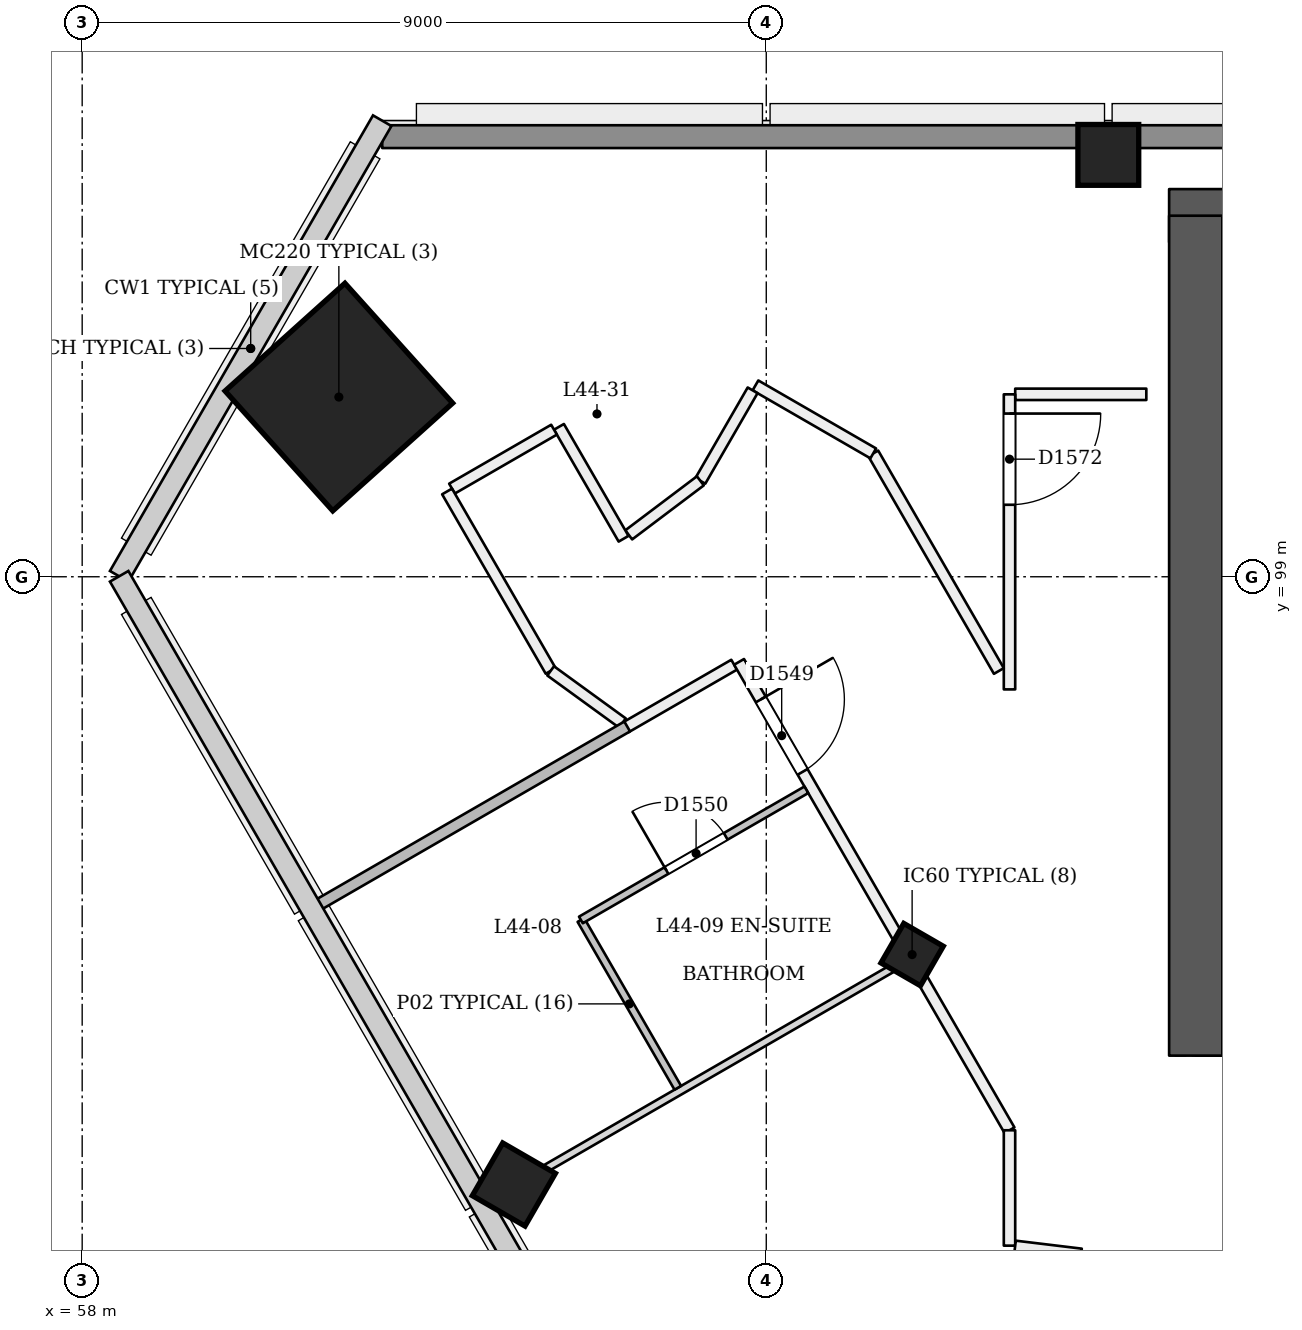
"""IFC4 building model, lengths in metres.
Left out: names, types, materials, properties, quantities, classifications, styles, units other than length and angle.
Written with IfcOpenShell. Run it as: python <this file> out.ifc"""

import sys

from ifc_helpers import new_model, si_unit, direction, frame, frame_2d, origin, origin_2d, place, context, subcontext, project, spatial, rectangle, extrude, element, fill, save


model = new_model("IFC4")
c1 = context("Model", 3, precision=1e-05, world=origin(), true_north=direction((0.0, 1.0)))
c2 = subcontext(c1, "Body", "Model", "MODEL_VIEW")
j1 = project(units=[si_unit("LENGTHUNIT", "METRE"), si_unit("PLANEANGLEUNIT", "RADIAN")], contexts=[c1])
p1 = place(None, origin())
s1 = spatial("IfcSite", under=j1, at=p1, CompositionType="ELEMENT")
p2 = place(p1, origin())
s2 = spatial("IfcBuilding", under=s1, at=p2, CompositionType="ELEMENT")
p3 = place(p2, frame((0.0, 0.0, 171.0)))
s3 = spatial("IfcBuildingStorey", under=s2, at=p3, CompositionType="ELEMENT", Elevation=171.0)
p4 = place(p3, frame((72.65, 93.05, 0.0), z_axis=(0.0, 0.0, 1.0), x_axis=(1.0, 0.0, 0.0)))
e1 = element("IfcWall", 1, at=p4, inside=s3, PredefinedType="SHEAR", context=c2, shape_type="SweptSolid", body=[
    extrude(rectangle(XDim=25.05, YDim=0.7, at=frame_2d((12.525, 0.0))), origin(), (0.0, 0.0, 1.0), 3.6),
])
p5 = place(p4, frame((1.15, 0.0, 0.0)))
e2 = element("IfcOpeningElement", 2, at=p5, cuts=e1, PredefinedType="OPENING", context=c2, shape_type="SweptSolid", body=[
    extrude(rectangle(XDim=1.2, YDim=2.1, at=frame_2d((0.6, 1.05))), frame((0.0, 0.36, 0.0), z_axis=(0.0, -1.0, 0.0), x_axis=(1.0, 0.0, 0.0)), (0.0, 0.0, 1.0), 0.721),
])
p6 = place(p4, frame((3.35, 0.0, 0.0)))
e3 = element("IfcOpeningElement", 3, at=p6, cuts=e1, PredefinedType="OPENING", context=c2, shape_type="SweptSolid", body=[
    extrude(rectangle(XDim=1.2, YDim=2.1, at=frame_2d((0.6, 1.05))), frame((0.0, 0.36, 0.0), z_axis=(0.0, -1.0, 0.0), x_axis=(1.0, 0.0, 0.0)), (0.0, 0.0, 1.0), 0.721),
])
p7 = place(p4, frame((13.35, 0.0, 0.0)))
e4 = element("IfcOpeningElement", 4, at=p7, cuts=e1, PredefinedType="OPENING", context=c2, shape_type="SweptSolid", body=[
    extrude(rectangle(XDim=1.2, YDim=2.1, at=frame_2d((0.6, 1.05))), frame((0.0, 0.36, 0.0), z_axis=(0.0, -1.0, 0.0), x_axis=(1.0, 0.0, 0.0)), (0.0, 0.0, 1.0), 0.721),
])
p8 = place(p4, frame((16.762, 0.0, 0.0)))
e5 = element("IfcOpeningElement", 5, at=p8, cuts=e1, PredefinedType="OPENING", context=c2, shape_type="SweptSolid", body=[
    extrude(rectangle(XDim=1.0, YDim=2.1, at=frame_2d((0.5, 1.05))), frame((0.0, 0.36, 0.0), z_axis=(0.0, -1.0, 0.0), x_axis=(1.0, 0.0, 0.0)), (0.0, 0.0, 1.0), 0.721),
])
p9 = place(p4, frame((20.65, 0.0, 0.0)))
e6 = element("IfcOpeningElement", 6, at=p9, cuts=e1, PredefinedType="OPENING", context=c2, shape_type="SweptSolid", body=[
    extrude(rectangle(XDim=1.0, YDim=2.1, at=frame_2d((0.5, 1.05))), frame((0.0, 0.36, 0.0), z_axis=(0.0, -1.0, 0.0), x_axis=(1.0, 0.0, 0.0)), (0.0, 0.0, 1.0), 0.721),
])
p10 = place(p4, frame((23.087, 0.0, 0.0)))
e7 = element("IfcOpeningElement", 7, at=p10, cuts=e1, PredefinedType="OPENING", context=c2, shape_type="SweptSolid", body=[
    extrude(rectangle(XDim=1.0, YDim=2.1, at=frame_2d((0.5, 1.05))), frame((0.0, 0.36, 0.0), z_axis=(0.0, -1.0, 0.0), x_axis=(1.0, 0.0, 0.0)), (0.0, 0.0, 1.0), 0.721),
])
p11 = place(p3, frame((97.35, 103.75, 0.0), z_axis=(0.0, 0.0, 1.0), x_axis=(-1.0, 0.0, 0.0)))
e8 = element("IfcWall", 8, at=p11, inside=s3, PredefinedType="SHEAR", context=c2, shape_type="SweptSolid", body=[
    extrude(rectangle(XDim=25.05, YDim=0.7, at=frame_2d((12.525, 0.0))), origin(), (0.0, 0.0, 1.0), 3.6),
])
p12 = place(p3, frame((72.65, 103.75, 0.0), z_axis=(0.0, 0.0, 1.0), x_axis=(0.0, -1.0, 0.0)))
e9 = element("IfcWall", 9, at=p12, inside=s3, PredefinedType="SHEAR", context=c2, shape_type="SweptSolid", body=[
    extrude(rectangle(XDim=11.05, YDim=0.7, at=frame_2d((5.525, 0.0))), origin(), (0.0, 0.0, 1.0), 3.6),
])
p13 = place(p3, frame((68.892, 93.982, -0.018), z_axis=(0.022153634206, 0.038480930364, 0.999013730882), x_axis=(-0.864979728815, -0.500331280926, 0.038453583269)))
e10 = element("IfcColumn", 10, at=p13, inside=s3, PredefinedType="COLUMN", context=c2, shape_type="SweptSolid", body=[
    extrude(rectangle(XDim=0.6, YDim=0.6, at=origin_2d()), origin(), (0.0, 0.0, 1.0), 3.604),
])
p14 = place(p3, frame((61.343, 101.353, 0.0), z_axis=(0.028401796786, 0.009286506348, 0.999553449666), x_axis=(-0.866206321778, 0.499287135176, 0.019974102218)))
e11 = element("IfcColumn", 11, at=p14, inside=s3, PredefinedType="COLUMN", context=c2, shape_type="SweptSolid", body=[
    extrude(rectangle(XDim=2.12, YDim=2.12, at=origin_2d()), origin(), (0.0, 0.0, 1.0), 3.602),
])
p15 = place(p3, frame((71.5, 104.55, 0.0), z_axis=(0.0, 0.0, 1.0), x_axis=(1.0, 0.0, 0.0)))
e12 = element("IfcColumn", 12, at=p15, inside=s3, PredefinedType="COLUMN", context=c2, shape_type="SweptSolid", body=[
    extrude(rectangle(XDim=0.8, YDim=0.8, at=origin_2d()), origin(), (0.0, 0.0, 1.0), 3.6),
])
p16 = place(p3, frame((63.652, 90.957, -0.024), z_axis=(0.02215519141, 0.038415882353, 0.999016199807), x_axis=(-0.865361947816, -0.499673614488, 0.038405445666)))
e13 = element("IfcColumn", 13, at=p16, inside=s3, PredefinedType="COLUMN", context=c2, shape_type="SweptSolid", body=[
    extrude(rectangle(XDim=0.8, YDim=0.8, at=origin_2d()), origin(), (0.0, 0.0, 1.0), 3.604),
])
p17 = place(p3, frame((65.151, 97.019, 0.0), z_axis=(0.0, 0.0, 1.0), x_axis=(0.865980649312, 0.50007750901, 0.0)))
e14 = element("IfcWall", 14, at=p17, inside=s3, PredefinedType="PARTITIONING", context=c2, shape_type="SweptSolid", body=[
    extrude(rectangle(XDim=1.647, YDim=0.15, at=frame_2d((0.823, 0.0))), origin(), (0.0, 0.0, 1.0), 3.15),
])
p18 = place(p3, frame((66.642, 97.88, 0.0), z_axis=(0.0, 0.0, 1.0), x_axis=(0.499976887781, -0.866038747219, 0.0)))
e15 = element("IfcWall", 15, at=p18, inside=s3, PredefinedType="PARTITIONING", context=c2, shape_type="SweptSolid", body=[
    extrude(rectangle(XDim=7.115, YDim=0.15, at=frame_2d((3.558, 0.0))), origin(), (0.0, 0.0, 1.0), 2.75),
])
p19 = place(p18, frame((0.571, 0.0, 0.0)))
e16 = element("IfcOpeningElement", 16, at=p19, cuts=e15, PredefinedType="OPENING", context=c2, shape_type="SweptSolid", body=[
    extrude(rectangle(XDim=1.1, YDim=2.1, at=frame_2d((0.55, 1.05))), frame((0.0, 0.085, 0.0), z_axis=(0.0, -1.0, 0.0), x_axis=(1.0, 0.0, 0.0)), (0.0, 0.0, 1.0), 0.171),
])
p20 = place(p3, frame((70.2, 91.718, 0.0), z_axis=(0.0, 0.0, 1.0), x_axis=(0.0, -1.0, 0.0)))
e17 = element("IfcWall", 17, at=p20, inside=s3, PredefinedType="PARTITIONING", context=c2, shape_type="SweptSolid", body=[
    extrude(rectangle(XDim=1.518, YDim=0.15, at=frame_2d((0.759, 0.0))), origin(), (0.0, 0.0, 1.0), 3.15),
])
p21 = place(p3, frame((70.274, 90.191, 0.0), z_axis=(0.0, 0.0, 1.0), x_axis=(0.99277212406, -0.120014622813, 0.0)))
e18 = element("IfcWall", 18, at=p21, inside=s3, PredefinedType="PARTITIONING", context=c2, shape_type="SweptSolid", body=[
    extrude(rectangle(XDim=0.875, YDim=0.15, at=frame_2d((0.438, 0.0))), origin(), (0.0, 0.0, 1.0), 3.15),
])
p22 = place(p3, frame((72.0, 101.4, 0.0), z_axis=(0.0, 0.0, 1.0), x_axis=(-1.0, 0.0, 0.0)))
e19 = element("IfcWall", 19, at=p22, inside=s3, PredefinedType="PARTITIONING", context=c2, shape_type="SweptSolid", body=[
    extrude(rectangle(XDim=1.725, YDim=0.15, at=frame_2d((0.863, 0.0))), origin(), (0.0, 0.0, 1.0), 3.15),
])
p23 = place(p3, frame((70.2, 101.4, 0.0), z_axis=(0.0, 0.0, 1.0), x_axis=(0.0, -1.0, 0.0)))
e20 = element("IfcWall", 20, at=p23, inside=s3, PredefinedType="PARTITIONING", context=c2, shape_type="SweptSolid", body=[
    extrude(rectangle(XDim=3.882, YDim=0.15, at=frame_2d((1.941, 0.0))), origin(), (0.0, 0.0, 1.0), 3.15),
])
p24 = place(p23, frame((0.253, 0.0, 0.0)))
e21 = element("IfcOpeningElement", 21, at=p24, cuts=e20, PredefinedType="OPENING", context=c2, shape_type="SweptSolid", body=[
    extrude(rectangle(XDim=1.2, YDim=2.1, at=frame_2d((0.6, 1.05))), frame((0.0, 0.085, 0.0), z_axis=(0.0, -1.0, 0.0), x_axis=(1.0, 0.0, 0.0)), (0.0, 0.0, 1.0), 0.171),
])
p25 = place(p3, frame((70.06, 97.76, 0.0), z_axis=(0.0, 0.0, 1.0), x_axis=(-0.499976073514, 0.866039217307, 0.0)))
e22 = element("IfcWall", 22, at=p25, inside=s3, PredefinedType="PARTITIONING", context=c2, shape_type="SweptSolid", body=[
    extrude(rectangle(XDim=3.305, YDim=0.15, at=frame_2d((1.653, 0.0))), origin(), (0.0, 0.0, 1.0), 3.15),
])
p26 = place(p3, frame((68.407, 100.623, 0.0), z_axis=(0.0, 0.0, 1.0), x_axis=(-0.866051527458, 0.499954749741, 0.0)))
e23 = element("IfcWall", 23, at=p26, inside=s3, PredefinedType="PARTITIONING", context=c2, shape_type="SweptSolid", body=[
    extrude(rectangle(XDim=1.789, YDim=0.15, at=frame_2d((0.895, 0.0))), origin(), (0.0, 0.0, 1.0), 3.15),
])
p27 = place(p3, frame((66.82, 101.453, 0.0), z_axis=(0.0, 0.0, 1.0), x_axis=(-0.499958106649, -0.866049589571, 0.0)))
e24 = element("IfcWall", 24, at=p27, inside=s3, PredefinedType="PARTITIONING", context=c2, shape_type="SweptSolid", body=[
    extrude(rectangle(XDim=1.375, YDim=0.15, at=frame_2d((0.688, 0.0))), origin(), (0.0, 0.0, 1.0), 3.15),
])
p28 = place(p3, frame((66.133, 100.262, 0.0), z_axis=(0.0, 0.0, 1.0), x_axis=(-0.798408652498, -0.602115955291, 0.0)))
e25 = element("IfcWall", 25, at=p28, inside=s3, PredefinedType="PARTITIONING", context=c2, shape_type="SweptSolid", body=[
    extrude(rectangle(XDim=1.18, YDim=0.15, at=frame_2d((0.59, 0.0))), origin(), (0.0, 0.0, 1.0), 3.15),
])
p29 = place(p3, frame((65.123, 99.5, 0.0), z_axis=(0.0, 0.0, 1.0), x_axis=(-0.500062241894, 0.865989465428, 0.0)))
e26 = element("IfcWall", 26, at=p29, inside=s3, PredefinedType="PARTITIONING", context=c2, shape_type="SweptSolid", body=[
    extrude(rectangle(XDim=1.7, YDim=0.15, at=frame_2d((0.85, 0.0))), origin(), (0.0, 0.0, 1.0), 3.15),
])
p30 = place(p3, frame((64.208, 100.935, 0.0), z_axis=(0.0, 0.0, 1.0), x_axis=(-0.865975732936, -0.500086022567, 0.0)))
e27 = element("IfcWall", 27, at=p30, inside=s3, PredefinedType="PARTITIONING", context=c2, shape_type="SweptSolid", body=[
    extrude(rectangle(XDim=1.55, YDim=0.15, at=frame_2d((0.775, 0.0))), origin(), (0.0, 0.0, 1.0), 3.15),
])
p31 = place(p3, frame((62.801, 100.122, 0.0), z_axis=(0.0, 0.0, 1.0), x_axis=(0.49993436518, -0.866063294749, 0.0)))
e28 = element("IfcWall", 28, at=p31, inside=s3, PredefinedType="PARTITIONING", context=c2, shape_type="SweptSolid", body=[
    extrude(rectangle(XDim=2.726, YDim=0.15, at=frame_2d((1.363, 0.0))), origin(), (0.0, 0.0, 1.0), 3.15),
])
p32 = place(p3, frame((64.163, 97.761, 0.0), z_axis=(0.0, 0.0, 1.0), x_axis=(0.809170199174, -0.587574326165, 0.0)))
e29 = element("IfcWall", 29, at=p32, inside=s3, PredefinedType="PARTITIONING", context=c2, shape_type="SweptSolid", body=[
    extrude(rectangle(XDim=1.167, YDim=0.15, at=frame_2d((0.583, 0.0))), origin(), (0.0, 0.0, 1.0), 3.15),
])
p33 = place(p3, frame((65.836, 92.276, 0.0), z_axis=(0.0, 0.0, 1.0), x_axis=(-0.500020783669, 0.866013403995, 0.0)))
e30 = element("IfcWall", 30, at=p33, inside=s3, PredefinedType="PARTITIONING", context=c2, shape_type="SweptSolid", body=[
    extrude(rectangle(XDim=2.55, YDim=0.1, at=frame_2d((1.275, 0.0))), origin(), (0.0, 0.0, 1.0), 2.75),
])
p34 = place(p3, frame((64.561, 94.485, 0.0), z_axis=(0.0, 0.0, 1.0), x_axis=(0.866050272892, 0.499956922968, 0.0)))
e31 = element("IfcWall", 31, at=p34, inside=s3, PredefinedType="PARTITIONING", context=c2, shape_type="SweptSolid", body=[
    extrude(rectangle(XDim=3.425, YDim=0.1, at=frame_2d((1.712, 0.0))), origin(), (0.0, 0.0, 1.0), 3.15),
])
p35 = place(p34, frame((1.3, 0.0, 0.0)))
e32 = element("IfcOpeningElement", 32, at=p35, cuts=e31, PredefinedType="OPENING", context=c2, shape_type="SweptSolid", body=[
    extrude(rectangle(XDim=0.9, YDim=2.1, at=frame_2d((0.45, 1.05))), frame((0.0, 0.061, 0.0), z_axis=(0.0, -1.0, 0.0), x_axis=(1.0, 0.0, 0.0)), (0.0, 0.0, 1.0), 0.121),
])
p36 = place(p3, frame((65.17, 97.03, 0.0), z_axis=(0.0, 0.0, 1.0), x_axis=(-0.866015897305, -0.500016465344, 0.0)))
e33 = element("IfcWall", 33, at=p36, inside=s3, PredefinedType="PARTITIONING", context=c2, shape_type="SweptSolid", body=[
    extrude(rectangle(XDim=4.72, YDim=0.15, at=frame_2d((2.36, 0.0))), origin(), (0.0, 0.0, 1.0), 2.65),
])
p37 = place(p3, frame((63.35, 90.783, 0.0), z_axis=(0.0, 0.0, 1.0), x_axis=(0.866015887322, 0.500016482634, 0.0)))
e34 = element("IfcWall", 34, at=p37, inside=s3, PredefinedType="PARTITIONING", context=c2, shape_type="SweptSolid", body=[
    extrude(rectangle(XDim=6.325, YDim=0.1, at=frame_2d((3.163, 0.0))), origin(), (0.0, 0.0, 1.0), 2.65),
])
p38 = place(p3, frame((61.947, 104.79, 0.0), z_axis=(0.0, 0.0, 1.0), x_axis=(1.0, 0.0, 0.0)))
e35 = element("IfcWall", 35, at=p38, inside=s3, PredefinedType="SOLIDWALL", context=c2, shape_type="SweptSolid", body=[
    extrude(rectangle(XDim=46.105, YDim=0.3, at=frame_2d((23.053, 0.0))), origin(), (0.0, 0.0, 1.0), 2.65),
])
p39 = place(p19, origin())
e36 = element("IfcDoor", 36, at=p39, inside=s3, OperationType="SINGLE_SWING_LEFT", PredefinedType="NOTDEFINED", context=c2, shape_type="SweptSolid", body=[
    extrude(rectangle(XDim=1.1, YDim=2.1, at=frame_2d((0.55, 1.05))), frame((0.0, 0.025, 0.0), z_axis=(0.0, -1.0, 0.0), x_axis=(1.0, 0.0, 0.0)), (0.0, 0.0, 1.0), 0.05),
])
fill(e16, e36)
p40 = place(p35, origin())
e37 = element("IfcDoor", 37, at=p40, inside=s3, OperationType="SINGLE_SWING_LEFT", PredefinedType="NOTDEFINED", context=c2, shape_type="SweptSolid", body=[
    extrude(rectangle(XDim=0.9, YDim=2.1, at=frame_2d((0.45, 1.05))), frame((0.0, 0.025, 0.0), z_axis=(0.0, -1.0, 0.0), x_axis=(1.0, 0.0, 0.0)), (0.0, 0.0, 1.0), 0.05),
])
fill(e32, e37)
p41 = place(p24, origin())
e38 = element("IfcDoor", 38, at=p41, inside=s3, OperationType="SINGLE_SWING_LEFT", PredefinedType="NOTDEFINED", context=c2, shape_type="SweptSolid", body=[
    extrude(rectangle(XDim=1.2, YDim=2.1, at=frame_2d((0.6, 1.05))), frame((0.0, 0.025, 0.0), z_axis=(0.0, -1.0, 0.0), x_axis=(1.0, 0.0, 0.0)), (0.0, 0.0, 1.0), 0.05),
])
fill(e21, e38)
save(model, sys.argv[1])
